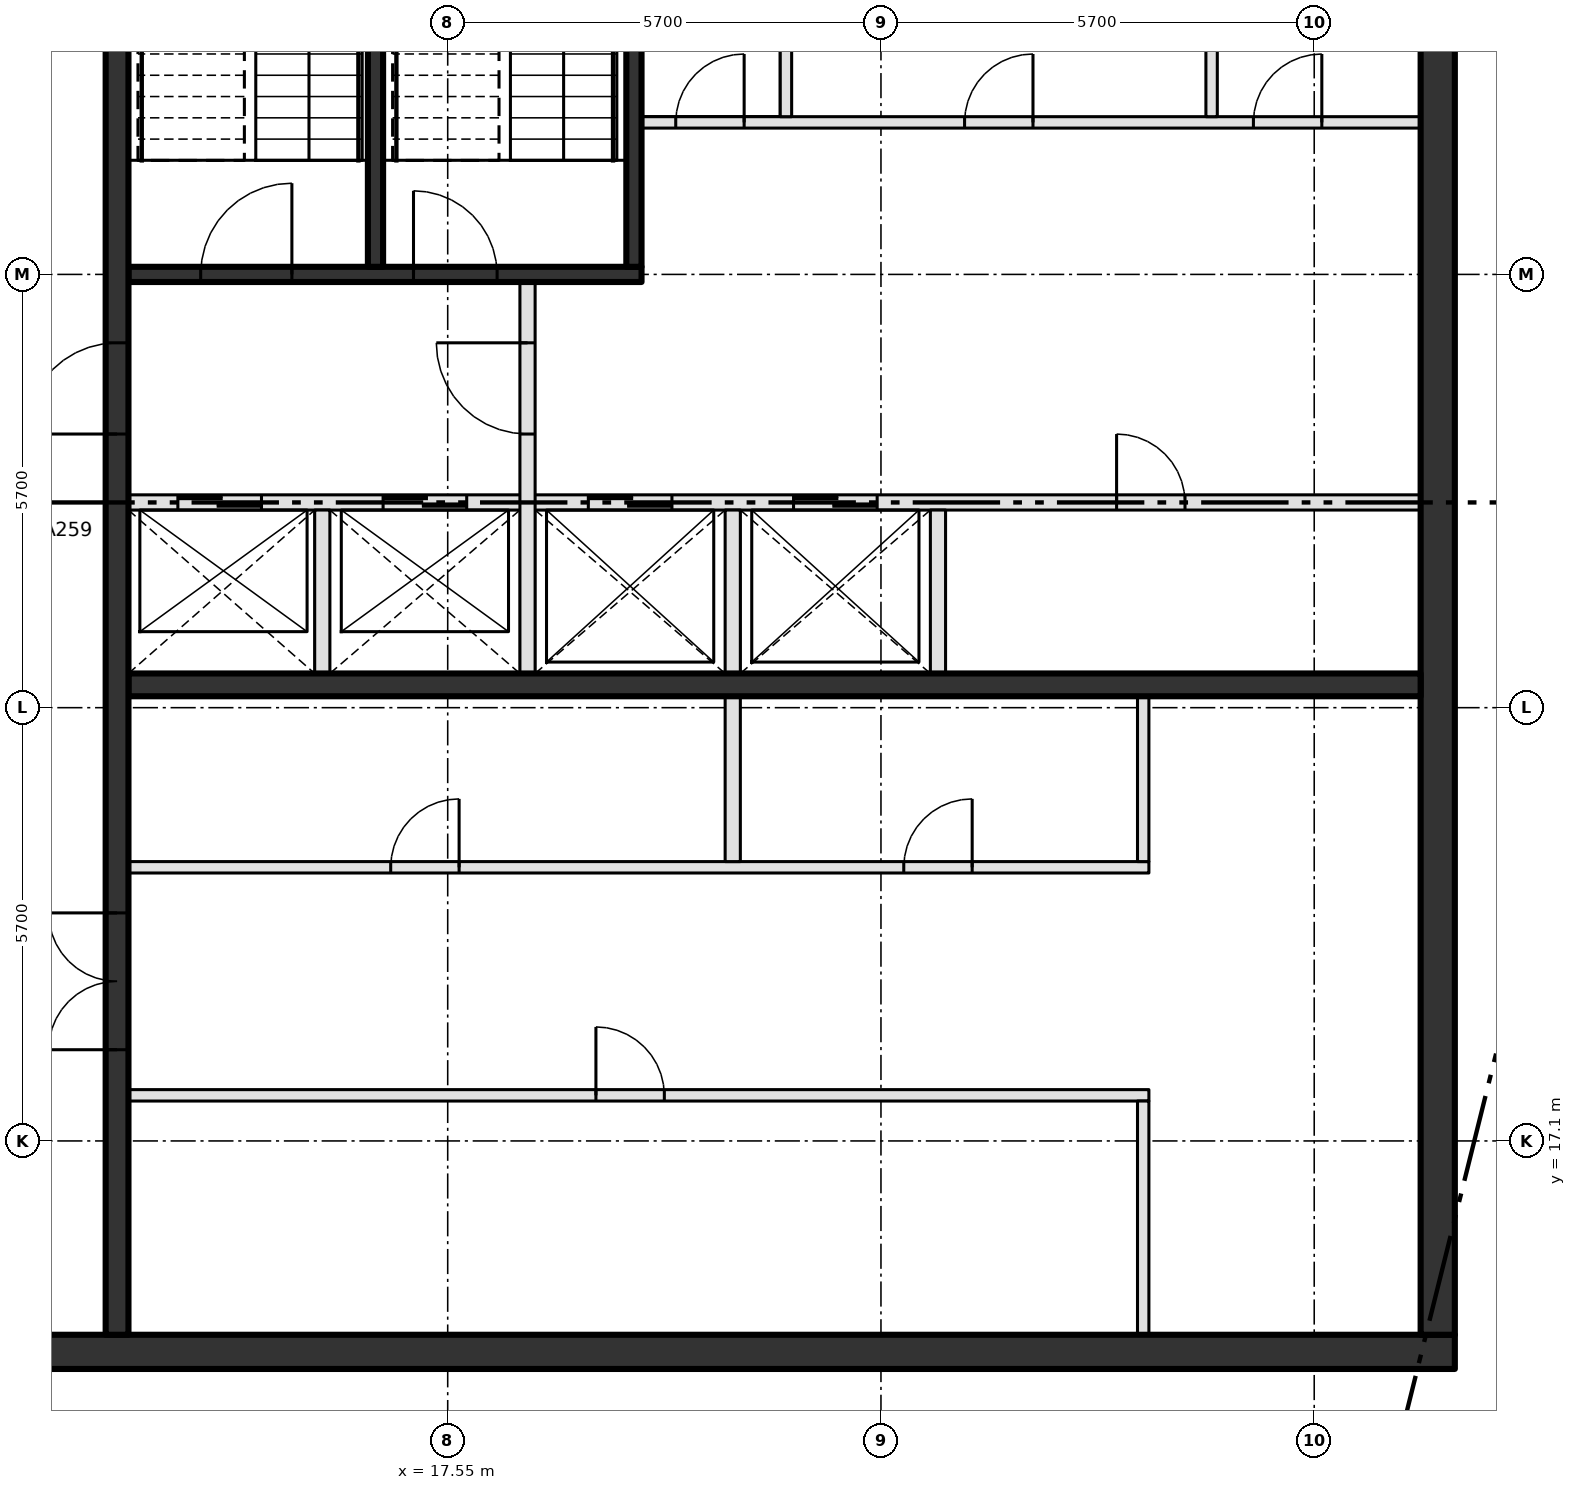
"""IFC4 building model, lengths in metres.
Left out: names, types, materials, properties, quantities, classifications, styles, units other than length and angle.
Written with IfcOpenShell. Run it as: python <this file> out.ifc"""

import sys

from ifc_helpers import new_model, si_unit, direction, frame, frame_2d, origin, place, context, subcontext, project, spatial, rectangle, extrude, element, fill, save


model = new_model("IFC4")
c1 = context("Model", 3, precision=1e-05, world=origin(), true_north=direction((0.0, 1.0)))
c2 = subcontext(c1, "Body", "Model", "MODEL_VIEW")
j1 = project(units=[si_unit("LENGTHUNIT", "METRE"), si_unit("PLANEANGLEUNIT", "RADIAN")], contexts=[c1])
p1 = place(None, origin())
s1 = spatial("IfcSite", under=j1, at=p1, CompositionType="ELEMENT")
p2 = place(p1, origin())
s2 = spatial("IfcBuilding", under=s1, at=p2, CompositionType="ELEMENT")
p3 = place(p2, frame((0.0, 0.0, 424.2)))
s3 = spatial("IfcBuildingStorey", under=s2, at=p3, CompositionType="ELEMENT", Elevation=424.2)
p4 = place(p3, frame((8.0, 14.325, -0.3), z_axis=(0.0, 0.0, 1.0), x_axis=(1.0, 0.0, 0.0)))
e1 = element("IfcWall", 1, at=p4, inside=s3, PredefinedType="SHEAR", context=c2, shape_type="SweptSolid", body=[
    extrude(rectangle(XDim=22.8, YDim=0.45, at=frame_2d((11.4, 0.0))), origin(), (0.0, 0.0, 1.0), 4.75),
])
p5 = place(p4, frame((2.3, 0.0, 0.3)))
e2 = element("IfcOpeningElement", 2, at=p5, cuts=e1, PredefinedType="OPENING", context=c2, shape_type="SweptSolid", body=[
    extrude(rectangle(XDim=1.8, YDim=2.1, at=frame_2d((0.9, 1.05))), frame((0.0, 0.235, 0.0), z_axis=(0.0, -1.0, 0.0), x_axis=(1.0, 0.0, 0.0)), (0.0, 0.0, 1.0), 0.47),
])
p6 = place(p3, frame((30.575, 14.55, -0.3), z_axis=(0.0, 0.0, 1.0), x_axis=(0.0, 1.0, 0.0)))
e3 = element("IfcWall", 3, at=p6, inside=s3, PredefinedType="SHEAR", context=c2, shape_type="SweptSolid", body=[
    extrude(rectangle(XDim=21.15, YDim=0.45, at=frame_2d((10.575, 0.0))), origin(), (0.0, 0.0, 1.0), 4.75),
])
p7 = place(p3, frame((13.35, 17.7, 0.0), z_axis=(0.0, 0.0, 1.0), x_axis=(1.0, 0.0, 0.0)))
e4 = element("IfcWall", 4, at=p7, inside=s3, PredefinedType="PARTITIONING", context=c2, shape_type="SweptSolid", body=[
    extrude(rectangle(XDim=13.425, YDim=0.15, at=frame_2d((6.712, 0.0))), origin(), (0.0, 0.0, 1.0), 4.45),
])
p8 = place(p7, frame((6.15, 0.0, 0.0)))
e5 = element("IfcOpeningElement", 5, at=p8, cuts=e4, PredefinedType="OPENING", context=c2, shape_type="SweptSolid", body=[
    extrude(rectangle(XDim=0.9, YDim=2.1, at=frame_2d((0.45, 1.05))), frame((0.0, 0.085, 0.0), z_axis=(0.0, -1.0, 0.0), x_axis=(1.0, 0.0, 0.0)), (0.0, 0.0, 1.0), 0.17),
])
p9 = place(p3, frame((13.35, 20.7, 0.0), z_axis=(0.0, 0.0, 1.0), x_axis=(1.0, 0.0, 0.0)))
e6 = element("IfcWall", 6, at=p9, inside=s3, PredefinedType="PARTITIONING", context=c2, shape_type="SweptSolid", body=[
    extrude(rectangle(XDim=13.425, YDim=0.15, at=frame_2d((6.712, 0.0))), origin(), (0.0, 0.0, 1.0), 4.45),
])
p10 = place(p9, frame((3.45, 0.0, 0.0)))
e7 = element("IfcOpeningElement", 7, at=p10, cuts=e6, PredefinedType="OPENING", context=c2, shape_type="SweptSolid", body=[
    extrude(rectangle(XDim=0.9, YDim=2.1, at=frame_2d((0.45, 1.05))), frame((0.0, 0.085, 0.0), z_axis=(0.0, -1.0, 0.0), x_axis=(1.0, 0.0, 0.0)), (0.0, 0.0, 1.0), 0.17),
])
p11 = place(p9, frame((10.2, 0.0, 0.0)))
e8 = element("IfcOpeningElement", 8, at=p11, cuts=e6, PredefinedType="OPENING", context=c2, shape_type="SweptSolid", body=[
    extrude(rectangle(XDim=0.9, YDim=2.1, at=frame_2d((0.45, 1.05))), frame((0.0, 0.085, 0.0), z_axis=(0.0, -1.0, 0.0), x_axis=(1.0, 0.0, 0.0)), (0.0, 0.0, 1.0), 0.17),
])
p12 = place(p3, frame((13.35, 23.1, 0.0), z_axis=(0.0, 0.0, 1.0), x_axis=(1.0, 0.0, 0.0)))
e9 = element("IfcWall", 9, at=p12, inside=s3, PredefinedType="SHEAR", context=c2, shape_type="SweptSolid", body=[
    extrude(rectangle(XDim=17.0, YDim=0.3, at=frame_2d((8.5, 0.0))), origin(), (0.0, 0.0, 1.0), 4.45),
])
p13 = place(p3, frame((13.35, 25.5, 0.0), z_axis=(0.0, 0.0, 1.0), x_axis=(1.0, 0.0, 0.0)))
e10 = element("IfcWall", 10, at=p13, inside=s3, PredefinedType="SOLIDWALL", context=c2, shape_type="SweptSolid", body=[
    extrude(rectangle(XDim=17.0, YDim=0.2, at=frame_2d((8.5, 0.0))), origin(), (0.0, 0.0, 1.0), 4.45),
])
p14 = place(p13, frame((0.65, 0.0, 0.0)))
e11 = element("IfcOpeningElement", 11, at=p14, cuts=e10, PredefinedType="OPENING", context=c2, shape_type="SweptSolid", body=[
    extrude(rectangle(XDim=1.1, YDim=2.1, at=frame_2d((0.55, 1.05))), frame((0.0, 0.11, 0.0), z_axis=(0.0, -1.0, 0.0), x_axis=(1.0, 0.0, 0.0)), (0.0, 0.0, 1.0), 0.22),
])
p15 = place(p13, frame((3.35, 0.0, 0.0)))
e12 = element("IfcOpeningElement", 12, at=p15, cuts=e10, PredefinedType="OPENING", context=c2, shape_type="SweptSolid", body=[
    extrude(rectangle(XDim=1.1, YDim=2.1, at=frame_2d((0.55, 1.05))), frame((0.0, 0.11, 0.0), z_axis=(0.0, -1.0, 0.0), x_axis=(1.0, 0.0, 0.0)), (0.0, 0.0, 1.0), 0.22),
])
p16 = place(p13, frame((6.05, 0.0, 0.0)))
e13 = element("IfcOpeningElement", 13, at=p16, cuts=e10, PredefinedType="OPENING", context=c2, shape_type="SweptSolid", body=[
    extrude(rectangle(XDim=1.1, YDim=2.1, at=frame_2d((0.55, 1.05))), frame((0.0, 0.11, 0.0), z_axis=(0.0, -1.0, 0.0), x_axis=(1.0, 0.0, 0.0)), (0.0, 0.0, 1.0), 0.22),
])
p17 = place(p13, frame((8.75, 0.0, 0.0)))
e14 = element("IfcOpeningElement", 14, at=p17, cuts=e10, PredefinedType="OPENING", context=c2, shape_type="SweptSolid", body=[
    extrude(rectangle(XDim=1.1, YDim=2.1, at=frame_2d((0.55, 1.05))), frame((0.0, 0.11, 0.0), z_axis=(0.0, -1.0, 0.0), x_axis=(1.0, 0.0, 0.0)), (0.0, 0.0, 1.0), 0.22),
])
p18 = place(p13, frame((13.0, 0.0, 0.0)))
e15 = element("IfcOpeningElement", 15, at=p18, cuts=e10, PredefinedType="OPENING", context=c2, shape_type="SweptSolid", body=[
    extrude(rectangle(XDim=0.9, YDim=2.1, at=frame_2d((0.45, 1.05))), frame((0.0, 0.11, 0.0), z_axis=(0.0, -1.0, 0.0), x_axis=(1.0, 0.0, 0.0)), (0.0, 0.0, 1.0), 0.22),
])
p19 = place(p3, frame((13.35, 28.5, 0.0), z_axis=(0.0, 0.0, 1.0), x_axis=(1.0, 0.0, 0.0)))
e16 = element("IfcWall", 16, at=p19, inside=s3, PredefinedType="SOLIDWALL", context=c2, shape_type="SweptSolid", body=[
    extrude(rectangle(XDim=6.75, YDim=0.2, at=frame_2d((3.375, 0.0))), origin(), (0.0, 0.0, 1.0), 4.45),
])
p20 = place(p19, frame((0.95, 0.0, 0.0)))
e17 = element("IfcOpeningElement", 17, at=p20, cuts=e16, PredefinedType="OPENING", context=c2, shape_type="SweptSolid", body=[
    extrude(rectangle(XDim=1.2, YDim=2.1, at=frame_2d((0.6, 1.05))), frame((0.0, 0.11, 0.0), z_axis=(0.0, -1.0, 0.0), x_axis=(1.0, 0.0, 0.0)), (0.0, 0.0, 1.0), 0.22),
])
p21 = place(p19, frame((3.75, 0.0, 0.0)))
e18 = element("IfcOpeningElement", 18, at=p21, cuts=e16, PredefinedType="OPENING", context=c2, shape_type="SweptSolid", body=[
    extrude(rectangle(XDim=1.1, YDim=2.1, at=frame_2d((0.55, 1.05))), frame((0.0, 0.11, 0.0), z_axis=(0.0, -1.0, 0.0), x_axis=(1.0, 0.0, 0.0)), (0.0, 0.0, 1.0), 0.22),
])
p22 = place(p3, frame((20.1, 30.5, 0.0), z_axis=(0.0, 0.0, 1.0), x_axis=(1.0, 0.0, 0.0)))
e19 = element("IfcWall", 19, at=p22, inside=s3, PredefinedType="PARTITIONING", context=c2, shape_type="SweptSolid", body=[
    extrude(rectangle(XDim=10.25, YDim=0.15, at=frame_2d((5.125, 0.0))), origin(), (0.0, 0.0, 1.0), 4.45),
])
p23 = place(p22, frame((0.45, 0.0, 0.0)))
e20 = element("IfcOpeningElement", 20, at=p23, cuts=e19, PredefinedType="OPENING", context=c2, shape_type="SweptSolid", body=[
    extrude(rectangle(XDim=0.9, YDim=2.1, at=frame_2d((0.45, 1.05))), frame((0.0, 0.085, 0.0), z_axis=(0.0, -1.0, 0.0), x_axis=(1.0, 0.0, 0.0)), (0.0, 0.0, 1.0), 0.17),
])
p24 = place(p22, frame((4.25, 0.0, 0.0)))
e21 = element("IfcOpeningElement", 21, at=p24, cuts=e19, PredefinedType="OPENING", context=c2, shape_type="SweptSolid", body=[
    extrude(rectangle(XDim=0.9, YDim=2.1, at=frame_2d((0.45, 1.05))), frame((0.0, 0.085, 0.0), z_axis=(0.0, -1.0, 0.0), x_axis=(1.0, 0.0, 0.0)), (0.0, 0.0, 1.0), 0.17),
])
p25 = place(p22, frame((8.05, 0.0, 0.0)))
e22 = element("IfcOpeningElement", 22, at=p25, cuts=e19, PredefinedType="OPENING", context=c2, shape_type="SweptSolid", body=[
    extrude(rectangle(XDim=0.9, YDim=2.1, at=frame_2d((0.45, 1.05))), frame((0.0, 0.085, 0.0), z_axis=(0.0, -1.0, 0.0), x_axis=(1.0, 0.0, 0.0)), (0.0, 0.0, 1.0), 0.17),
])
p26 = place(p3, frame((13.2, 14.55, 0.0), z_axis=(0.0, 0.0, 1.0), x_axis=(0.0, 1.0, 0.0)))
e23 = element("IfcWall", 23, at=p26, inside=s3, PredefinedType="SHEAR", context=c2, shape_type="SweptSolid", body=[
    extrude(rectangle(XDim=21.15, YDim=0.3, at=frame_2d((10.575, 0.0))), origin(), (0.0, 0.0, 1.0), 4.45),
])
p27 = place(p26, frame((3.75, 0.0, 0.0)))
e24 = element("IfcOpeningElement", 24, at=p27, cuts=e23, PredefinedType="OPENING", context=c2, shape_type="SweptSolid", body=[
    extrude(rectangle(XDim=1.8, YDim=2.1, at=frame_2d((0.9, 1.05))), frame((0.0, 0.16, 0.0), z_axis=(0.0, -1.0, 0.0), x_axis=(1.0, 0.0, 0.0)), (0.0, 0.0, 1.0), 0.32),
])
p28 = place(p26, frame((11.85, 0.0, 0.0)))
e25 = element("IfcOpeningElement", 25, at=p28, cuts=e23, PredefinedType="OPENING", context=c2, shape_type="SweptSolid", body=[
    extrude(rectangle(XDim=1.2, YDim=2.1, at=frame_2d((0.6, 1.05))), frame((0.0, 0.16, 0.0), z_axis=(0.0, -1.0, 0.0), x_axis=(1.0, 0.0, 0.0)), (0.0, 0.0, 1.0), 0.32),
])
p29 = place(p3, frame((15.9, 23.25, 0.0), z_axis=(0.0, 0.0, 1.0), x_axis=(0.0, 1.0, 0.0)))
e26 = element("IfcWall", 26, at=p29, inside=s3, PredefinedType="SOLIDWALL", context=c2, shape_type="SweptSolid", body=[
    extrude(rectangle(XDim=2.15, YDim=0.2, at=frame_2d((1.075, 0.0))), origin(), (0.0, 0.0, 1.0), 4.45),
])
p30 = place(p3, frame((16.6, 28.6, 0.0), z_axis=(0.0, 0.0, 1.0), x_axis=(0.0, 1.0, 0.0)))
e27 = element("IfcWall", 27, at=p30, inside=s3, PredefinedType="SOLIDWALL", context=c2, shape_type="SweptSolid", body=[
    extrude(rectangle(XDim=7.1, YDim=0.2, at=frame_2d((3.55, 0.0))), origin(), (0.0, 0.0, 1.0), 4.45),
])
p31 = place(p3, frame((18.6, 23.25, 0.0), z_axis=(0.0, 0.0, 1.0), x_axis=(0.0, 1.0, 0.0)))
e28 = element("IfcWall", 28, at=p31, inside=s3, PredefinedType="SOLIDWALL", context=c2, shape_type="SweptSolid", body=[
    extrude(rectangle(XDim=5.15, YDim=0.2, at=frame_2d((2.575, 0.0))), origin(), (0.0, 0.0, 1.0), 4.45),
])
p32 = place(p31, frame((3.15, 0.0, 0.0)))
e29 = element("IfcOpeningElement", 29, at=p32, cuts=e28, PredefinedType="OPENING", context=c2, shape_type="SweptSolid", body=[
    extrude(rectangle(XDim=1.2, YDim=2.1, at=frame_2d((0.6, 1.05))), frame((0.0, 0.11, 0.0), z_axis=(0.0, -1.0, 0.0), x_axis=(1.0, 0.0, 0.0)), (0.0, 0.0, 1.0), 0.22),
])
p33 = place(p3, frame((20.0, 28.6, 0.0), z_axis=(0.0, 0.0, 1.0), x_axis=(0.0, 1.0, 0.0)))
e30 = element("IfcWall", 30, at=p33, inside=s3, PredefinedType="SOLIDWALL", context=c2, shape_type="SweptSolid", body=[
    extrude(rectangle(XDim=7.1, YDim=0.2, at=frame_2d((3.55, 0.0))), origin(), (0.0, 0.0, 1.0), 4.45),
])
p34 = place(p3, frame((21.3, 20.775, 0.0), z_axis=(0.0, 0.0, 1.0), x_axis=(0.0, 1.0, 0.0)))
e31 = element("IfcWall", 31, at=p34, inside=s3, PredefinedType="SOLIDWALL", context=c2, shape_type="SweptSolid", body=[
    extrude(rectangle(XDim=4.625, YDim=0.2, at=frame_2d((2.312, 0.0))), origin(), (0.0, 0.0, 1.0), 4.45),
])
p35 = place(p3, frame((22.0, 30.575, 0.0), z_axis=(0.0, 0.0, 1.0), x_axis=(0.0, 1.0, 0.0)))
e32 = element("IfcWall", 32, at=p35, inside=s3, PredefinedType="PARTITIONING", context=c2, shape_type="SweptSolid", body=[
    extrude(rectangle(XDim=5.125, YDim=0.15, at=frame_2d((2.562, 0.0))), origin(), (0.0, 0.0, 1.0), 4.45),
])
p36 = place(p3, frame((24.0, 23.25, 0.0), z_axis=(0.0, 0.0, 1.0), x_axis=(0.0, 1.0, 0.0)))
e33 = element("IfcWall", 33, at=p36, inside=s3, PredefinedType="SOLIDWALL", context=c2, shape_type="SweptSolid", body=[
    extrude(rectangle(XDim=2.15, YDim=0.2, at=frame_2d((1.075, 0.0))), origin(), (0.0, 0.0, 1.0), 4.45),
])
p37 = place(p3, frame((26.7, 14.55, 0.0), z_axis=(0.0, 0.0, 1.0), x_axis=(0.0, 1.0, 0.0)))
e34 = element("IfcWall", 34, at=p37, inside=s3, PredefinedType="PARTITIONING", context=c2, shape_type="SweptSolid", body=[
    extrude(rectangle(XDim=3.075, YDim=0.15, at=frame_2d((1.538, 0.0))), origin(), (0.0, 0.0, 1.0), 4.45),
])
p38 = place(p3, frame((26.7, 20.775, 0.0), z_axis=(0.0, 0.0, 1.0), x_axis=(0.0, 1.0, 0.0)))
e35 = element("IfcWall", 35, at=p38, inside=s3, PredefinedType="PARTITIONING", context=c2, shape_type="SweptSolid", body=[
    extrude(rectangle(XDim=2.175, YDim=0.15, at=frame_2d((1.087, 0.0))), origin(), (0.0, 0.0, 1.0), 4.45),
])
p39 = place(p3, frame((27.6, 30.575, 0.0), z_axis=(0.0, 0.0, 1.0), x_axis=(0.0, 1.0, 0.0)))
e36 = element("IfcWall", 36, at=p39, inside=s3, PredefinedType="PARTITIONING", context=c2, shape_type="SweptSolid", body=[
    extrude(rectangle(XDim=5.125, YDim=0.15, at=frame_2d((2.562, 0.0))), origin(), (0.0, 0.0, 1.0), 4.45),
])
p40 = place(p14, origin())
e37 = element("IfcDoor", 37, at=p40, inside=s3, OperationType="SLIDING_TO_LEFT", PredefinedType="DOOR", context=c2, shape_type="SweptSolid", body=[
    extrude(rectangle(XDim=1.1, YDim=2.1, at=frame_2d((0.55, 1.05))), frame((0.0, 0.025, 0.0), z_axis=(0.0, -1.0, 0.0), x_axis=(1.0, 0.0, 0.0)), (0.0, 0.0, 1.0), 0.05),
])
fill(e11, e37)
p41 = place(p15, origin())
e38 = element("IfcDoor", 38, at=p41, inside=s3, OperationType="SLIDING_TO_LEFT", PredefinedType="DOOR", context=c2, shape_type="SweptSolid", body=[
    extrude(rectangle(XDim=1.1, YDim=2.1, at=frame_2d((0.55, 1.05))), frame((0.0, 0.025, 0.0), z_axis=(0.0, -1.0, 0.0), x_axis=(1.0, 0.0, 0.0)), (0.0, 0.0, 1.0), 0.05),
])
fill(e12, e38)
p42 = place(p16, origin())
e39 = element("IfcDoor", 39, at=p42, inside=s3, OperationType="SLIDING_TO_LEFT", PredefinedType="DOOR", context=c2, shape_type="SweptSolid", body=[
    extrude(rectangle(XDim=1.1, YDim=2.1, at=frame_2d((0.55, 1.05))), frame((0.0, 0.025, 0.0), z_axis=(0.0, -1.0, 0.0), x_axis=(1.0, 0.0, 0.0)), (0.0, 0.0, 1.0), 0.05),
])
fill(e13, e39)
p43 = place(p17, origin())
e40 = element("IfcDoor", 40, at=p43, inside=s3, OperationType="SLIDING_TO_LEFT", PredefinedType="DOOR", context=c2, shape_type="SweptSolid", body=[
    extrude(rectangle(XDim=1.1, YDim=2.1, at=frame_2d((0.55, 1.05))), frame((0.0, 0.025, 0.0), z_axis=(0.0, -1.0, 0.0), x_axis=(1.0, 0.0, 0.0)), (0.0, 0.0, 1.0), 0.05),
])
fill(e14, e40)
p44 = place(p8, origin())
e41 = element("IfcDoor", 41, at=p44, inside=s3, OperationType="SINGLE_SWING_LEFT", PredefinedType="DOOR", context=c2, shape_type="SweptSolid", body=[
    extrude(rectangle(XDim=0.9, YDim=2.1, at=frame_2d((0.45, 1.05))), frame((0.0, 0.025, 0.0), z_axis=(0.0, -1.0, 0.0), x_axis=(1.0, 0.0, 0.0)), (0.0, 0.0, 1.0), 0.05),
])
fill(e5, e41)
p45 = place(p10, origin())
e42 = element("IfcDoor", 42, at=p45, inside=s3, OperationType="SINGLE_SWING_RIGHT", PredefinedType="DOOR", context=c2, shape_type="SweptSolid", body=[
    extrude(rectangle(XDim=0.9, YDim=2.1, at=frame_2d((0.45, 1.05))), frame((0.0, 0.025, 0.0), z_axis=(0.0, -1.0, 0.0), x_axis=(1.0, 0.0, 0.0)), (0.0, 0.0, 1.0), 0.05),
])
fill(e7, e42)
p46 = place(p11, origin())
e43 = element("IfcDoor", 43, at=p46, inside=s3, OperationType="SINGLE_SWING_RIGHT", PredefinedType="DOOR", context=c2, shape_type="SweptSolid", body=[
    extrude(rectangle(XDim=0.9, YDim=2.1, at=frame_2d((0.45, 1.05))), frame((0.0, 0.025, 0.0), z_axis=(0.0, -1.0, 0.0), x_axis=(1.0, 0.0, 0.0)), (0.0, 0.0, 1.0), 0.05),
])
fill(e8, e43)
p47 = place(p18, origin())
e44 = element("IfcDoor", 44, at=p47, inside=s3, OperationType="SINGLE_SWING_LEFT", PredefinedType="DOOR", context=c2, shape_type="SweptSolid", body=[
    extrude(rectangle(XDim=0.9, YDim=2.1, at=frame_2d((0.45, 1.05))), frame((0.0, 0.025, 0.0), z_axis=(0.0, -1.0, 0.0), x_axis=(1.0, 0.0, 0.0)), (0.0, 0.0, 1.0), 0.05),
])
fill(e15, e44)
p48 = place(p23, origin())
e45 = element("IfcDoor", 45, at=p48, inside=s3, OperationType="SINGLE_SWING_RIGHT", PredefinedType="DOOR", context=c2, shape_type="SweptSolid", body=[
    extrude(rectangle(XDim=0.9, YDim=2.1, at=frame_2d((0.45, 1.05))), frame((0.0, 0.025, 0.0), z_axis=(0.0, -1.0, 0.0), x_axis=(1.0, 0.0, 0.0)), (0.0, 0.0, 1.0), 0.05),
])
fill(e20, e45)
p49 = place(p24, origin())
e46 = element("IfcDoor", 46, at=p49, inside=s3, OperationType="SINGLE_SWING_RIGHT", PredefinedType="DOOR", context=c2, shape_type="SweptSolid", body=[
    extrude(rectangle(XDim=0.9, YDim=2.1, at=frame_2d((0.45, 1.05))), frame((0.0, 0.025, 0.0), z_axis=(0.0, -1.0, 0.0), x_axis=(1.0, 0.0, 0.0)), (0.0, 0.0, 1.0), 0.05),
])
fill(e21, e46)
p50 = place(p25, origin())
e47 = element("IfcDoor", 47, at=p50, inside=s3, OperationType="SINGLE_SWING_RIGHT", PredefinedType="DOOR", context=c2, shape_type="SweptSolid", body=[
    extrude(rectangle(XDim=0.9, YDim=2.1, at=frame_2d((0.45, 1.05))), frame((0.0, 0.025, 0.0), z_axis=(0.0, -1.0, 0.0), x_axis=(1.0, 0.0, 0.0)), (0.0, 0.0, 1.0), 0.05),
])
fill(e22, e47)
p51 = place(p20, origin())
e48 = element("IfcDoor", 48, at=p51, inside=s3, OperationType="SINGLE_SWING_RIGHT", PredefinedType="DOOR", context=c2, shape_type="SweptSolid", body=[
    extrude(rectangle(XDim=1.2, YDim=2.1, at=frame_2d((0.6, 1.05))), frame((0.0, 0.025, 0.0), z_axis=(0.0, -1.0, 0.0), x_axis=(1.0, 0.0, 0.0)), (0.0, 0.0, 1.0), 0.05),
])
fill(e17, e48)
p52 = place(p21, origin())
e49 = element("IfcDoor", 49, at=p52, inside=s3, OperationType="SINGLE_SWING_LEFT", PredefinedType="DOOR", context=c2, shape_type="SweptSolid", body=[
    extrude(rectangle(XDim=1.1, YDim=2.1, at=frame_2d((0.55, 1.05))), frame((0.0, 0.025, 0.0), z_axis=(0.0, -1.0, 0.0), x_axis=(1.0, 0.0, 0.0)), (0.0, 0.0, 1.0), 0.05),
])
fill(e18, e49)
p53 = place(p27, origin())
e50 = element("IfcDoor", 50, at=p53, inside=s3, OperationType="DOUBLE_DOOR_SINGLE_SWING", PredefinedType="DOOR", context=c2, shape_type="SweptSolid", body=[
    extrude(rectangle(XDim=1.8, YDim=2.1, at=frame_2d((0.9, 1.05))), frame((0.0, 0.025, 0.0), z_axis=(0.0, -1.0, 0.0), x_axis=(1.0, 0.0, 0.0)), (0.0, 0.0, 1.0), 0.05),
])
fill(e24, e50)
p54 = place(p28, origin())
e51 = element("IfcDoor", 51, at=p54, inside=s3, OperationType="SINGLE_SWING_LEFT", PredefinedType="DOOR", context=c2, shape_type="SweptSolid", body=[
    extrude(rectangle(XDim=1.2, YDim=2.1, at=frame_2d((0.6, 1.05))), frame((0.0, 0.025, 0.0), z_axis=(0.0, -1.0, 0.0), x_axis=(1.0, 0.0, 0.0)), (0.0, 0.0, 1.0), 0.05),
])
fill(e25, e51)
p55 = place(p32, origin())
e52 = element("IfcDoor", 52, at=p55, inside=s3, OperationType="SINGLE_SWING_RIGHT", PredefinedType="DOOR", context=c2, shape_type="SweptSolid", body=[
    extrude(rectangle(XDim=1.2, YDim=2.1, at=frame_2d((0.6, 1.05))), frame((0.0, 0.025, 0.0), z_axis=(0.0, -1.0, 0.0), x_axis=(1.0, 0.0, 0.0)), (0.0, 0.0, 1.0), 0.05),
])
fill(e29, e52)
save(model, sys.argv[1])
